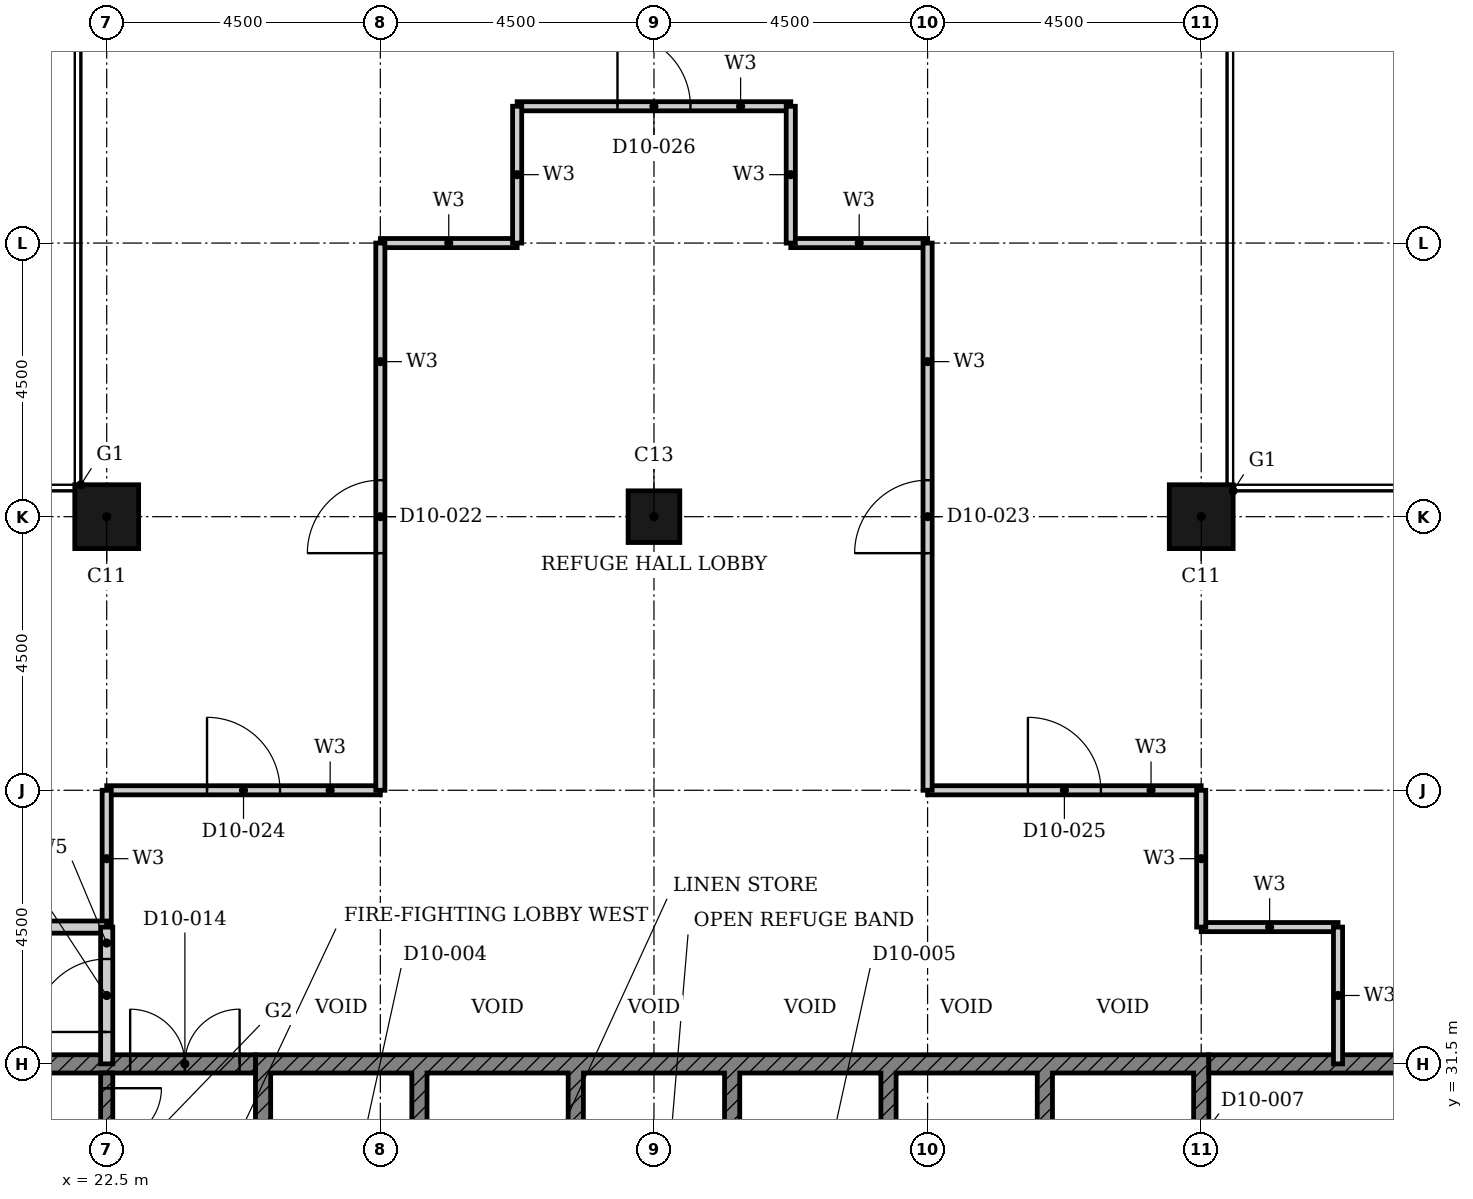
"""IFC4 building model, lengths in metres.
Left out: names, types, materials, properties, quantities, classifications, styles, units other than length and angle.
Written with IfcOpenShell. Run it as: python <this file> out.ifc"""

import sys

from ifc_helpers import new_model, si_unit, direction, frame, frame_2d, origin, origin_2d, place, context, subcontext, project, spatial, polyline, rectangle, hollow_rectangle, outline, extrude, element, fill, save


model = new_model("IFC4")
c1 = context("Model", 3, precision=1e-05, world=origin(), true_north=direction((0.0, 1.0)))
c2 = subcontext(c1, "Body", "Model", "MODEL_VIEW")
j1 = project(units=[si_unit("LENGTHUNIT", "METRE"), si_unit("PLANEANGLEUNIT", "RADIAN")], contexts=[c1])
p1 = place(None, origin())
s1 = spatial("IfcSite", under=j1, at=p1, CompositionType="ELEMENT")
p2 = place(p1, origin())
s2 = spatial("IfcBuilding", under=s1, at=p2, CompositionType="ELEMENT")
p3 = place(p2, frame((0.0, 0.0, 48.0)))
s3 = spatial("IfcBuildingStorey", under=s2, at=p3, CompositionType="ELEMENT", Elevation=48.0)
for number, where, z_axis, x_axis in (
    (1, (40.5, 40.5, 0.0), (0.0, 0.0, 1.0), (1.0, 0.0, 0.0)),
    (2, (22.5, 40.5, 0.0), (0.0, 0.0, 1.0), (1.0, 0.0, 0.0)),
):
    element("IfcColumn", number, at=place(p3, frame(where, z_axis=z_axis, x_axis=x_axis)), inside=s3, PredefinedType="COLUMN", context=c2, shape_type="SweptSolid", body=[
        extrude(hollow_rectangle(XDim=1.05, YDim=1.05, WallThickness=0.034, at=origin_2d()), origin(), (0.0, 0.0, 1.0), 4.8),
    ])
p4 = place(p3, frame((31.5, 40.5, 0.0), z_axis=(0.0, 0.0, 1.0), x_axis=(1.0, 0.0, 0.0)))
e3 = element("IfcColumn", 3, at=p4, inside=s3, PredefinedType="COLUMN", context=c2, shape_type="SweptSolid", body=[
    extrude(hollow_rectangle(XDim=0.85, YDim=0.85, WallThickness=0.026, at=origin_2d()), origin(), (0.0, 0.0, 1.0), 4.8),
])
p5 = place(p3, origin())
e4 = element("IfcWall", 4, at=p5, inside=s3, PredefinedType="SHEAR", context=c2, shape_type="SweptSolid", body=[
    extrude(outline(polyline([(24.947, 28.725), (25.197, 28.725), (25.197, 31.35), (27.518, 31.35), (27.518, 28.725), (27.768, 28.725), (27.768, 31.35), (30.089, 31.35), (30.089, 28.725), (30.339, 28.725), (30.339, 31.35), (32.661, 31.35), (32.661, 28.725), (32.911, 28.725), (32.911, 31.35), (35.232, 31.35), (35.232, 28.725), (35.482, 28.725), (35.482, 31.35), (37.803, 31.35), (37.803, 28.725), (38.053, 28.725), (38.053, 31.35), (40.375, 31.35), (40.375, 28.725), (40.625, 28.725), (40.625, 31.65), (24.947, 31.65), (24.947, 28.725)])), origin(), (0.0, 0.0, 1.0), 4.5),
])
p6 = place(p3, frame((18.15, 31.5, 0.0), z_axis=(0.0, 0.0, 1.0), x_axis=(1.0, 0.0, 0.0)))
e5 = element("IfcWall", 5, at=p6, inside=s3, PredefinedType="SHEAR", context=c2, shape_type="SweptSolid", body=[
    extrude(rectangle(XDim=6.797, YDim=0.3, at=frame_2d((3.398, 0.0))), origin(), (0.0, 0.0, 1.0), 4.5),
])
p7 = place(p6, frame((4.736, 0.0, 0.0)))
e6 = element("IfcOpeningElement", 6, at=p7, cuts=e5, PredefinedType="OPENING", context=c2, shape_type="SweptSolid", body=[
    extrude(rectangle(XDim=1.8, YDim=2.1, at=frame_2d((0.9, 1.05))), frame((0.0, 0.16, 0.0), z_axis=(0.0, -1.0, 0.0), x_axis=(1.0, 0.0, 0.0)), (0.0, 0.0, 1.0), 0.32),
])
p8 = place(p3, frame((40.625, 31.5, 0.0), z_axis=(0.0, 0.0, 1.0), x_axis=(1.0, 0.0, 0.0)))
e7 = element("IfcWall", 7, at=p8, inside=s3, PredefinedType="SHEAR", context=c2, shape_type="SweptSolid", body=[
    extrude(rectangle(XDim=4.225, YDim=0.3, at=frame_2d((2.113, 0.0))), origin(), (0.0, 0.0, 1.0), 4.5),
])
p9 = place(p3, frame((22.5, 31.35, 0.0), z_axis=(0.0, 0.0, 1.0), x_axis=(0.0, -1.0, 0.0)))
e8 = element("IfcWall", 8, at=p9, inside=s3, PredefinedType="SHEAR", context=c2, shape_type="SweptSolid", body=[
    extrude(rectangle(XDim=5.825, YDim=0.2, at=frame_2d((2.913, 0.0))), origin(), (0.0, 0.0, 1.0), 4.5),
])
p10 = place(p9, frame((0.25, 0.0, 0.0)))
e9 = element("IfcOpeningElement", 9, at=p10, cuts=e8, PredefinedType="OPENING", context=c2, shape_type="SweptSolid", body=[
    extrude(rectangle(XDim=1.8, YDim=2.1, at=frame_2d((0.9, 1.05))), frame((0.0, 0.11, 0.0), z_axis=(0.0, -1.0, 0.0), x_axis=(1.0, 0.0, 0.0)), (0.0, 0.0, 1.0), 0.22),
])
p11 = place(p3, frame((40.5, 33.75, 0.0), z_axis=(0.0, 0.0, 1.0), x_axis=(1.0, 0.0, 0.0)))
e10 = element("IfcWall", 10, at=p11, inside=s3, PredefinedType="PARTITIONING", context=c2, shape_type="SweptSolid", body=[
    extrude(rectangle(XDim=2.25, YDim=0.15, at=frame_2d((1.125, 0.0))), origin(), (0.0, 0.0, 1.0), 4.5),
])
p12 = place(p3, frame((22.5, 36.0, 0.0), z_axis=(0.0, 0.0, 1.0), x_axis=(1.0, 0.0, 0.0)))
e11 = element("IfcWall", 11, at=p12, inside=s3, PredefinedType="PARTITIONING", context=c2, shape_type="SweptSolid", body=[
    extrude(rectangle(XDim=4.5, YDim=0.15, at=frame_2d((2.25, 0.0))), origin(), (0.0, 0.0, 1.0), 4.5),
])
p13 = place(p12, frame((1.65, 0.0, 0.0)))
e12 = element("IfcOpeningElement", 12, at=p13, cuts=e11, PredefinedType="OPENING", context=c2, shape_type="SweptSolid", body=[
    extrude(rectangle(XDim=1.2, YDim=2.1, at=frame_2d((0.6, 1.05))), frame((0.0, 0.085, 0.0), z_axis=(0.0, -1.0, 0.0), x_axis=(1.0, 0.0, 0.0)), (0.0, 0.0, 1.0), 0.17),
])
p14 = place(p3, frame((36.0, 36.0, 0.0), z_axis=(0.0, 0.0, 1.0), x_axis=(1.0, 0.0, 0.0)))
e13 = element("IfcWall", 13, at=p14, inside=s3, PredefinedType="PARTITIONING", context=c2, shape_type="SweptSolid", body=[
    extrude(rectangle(XDim=4.5, YDim=0.15, at=frame_2d((2.25, 0.0))), origin(), (0.0, 0.0, 1.0), 4.5),
])
p15 = place(p14, frame((1.65, 0.0, 0.0)))
e14 = element("IfcOpeningElement", 14, at=p15, cuts=e13, PredefinedType="OPENING", context=c2, shape_type="SweptSolid", body=[
    extrude(rectangle(XDim=1.2, YDim=2.1, at=frame_2d((0.6, 1.05))), frame((0.0, 0.085, 0.0), z_axis=(0.0, -1.0, 0.0), x_axis=(1.0, 0.0, 0.0)), (0.0, 0.0, 1.0), 0.17),
])
for number, where, z_axis, x_axis in (
    (15, (27.0, 45.0, 0.0), (0.0, 0.0, 1.0), (1.0, 0.0, 0.0)),
    (16, (33.75, 45.0, 0.0), (0.0, 0.0, 1.0), (1.0, 0.0, 0.0)),
):
    element("IfcWall", number, at=place(p3, frame(where, z_axis=z_axis, x_axis=x_axis)), inside=s3, PredefinedType="PARTITIONING", context=c2, shape_type="SweptSolid", body=[
        extrude(rectangle(XDim=2.25, YDim=0.15, at=frame_2d((1.125, 0.0))), origin(), (0.0, 0.0, 1.0), 4.5),
    ])
p16 = place(p3, frame((29.25, 47.25, 0.0), z_axis=(0.0, 0.0, 1.0), x_axis=(1.0, 0.0, 0.0)))
e17 = element("IfcWall", 17, at=p16, inside=s3, PredefinedType="PARTITIONING", context=c2, shape_type="SweptSolid", body=[
    extrude(rectangle(XDim=4.5, YDim=0.15, at=frame_2d((2.25, 0.0))), origin(), (0.0, 0.0, 1.0), 4.5),
])
p17 = place(p16, frame((1.65, 0.0, 0.0)))
e18 = element("IfcOpeningElement", 18, at=p17, cuts=e17, PredefinedType="OPENING", context=c2, shape_type="SweptSolid", body=[
    extrude(rectangle(XDim=1.2, YDim=2.1, at=frame_2d((0.6, 1.05))), frame((0.0, 0.085, 0.0), z_axis=(0.0, -1.0, 0.0), x_axis=(1.0, 0.0, 0.0)), (0.0, 0.0, 1.0), 0.17),
])
p18 = place(p3, frame((22.5, 33.75, 0.0), z_axis=(0.0, 0.0, 1.0), x_axis=(0.0, 1.0, 0.0)))
e19 = element("IfcWall", 19, at=p18, inside=s3, PredefinedType="PARTITIONING", context=c2, shape_type="SweptSolid", body=[
    extrude(rectangle(XDim=2.25, YDim=0.15, at=frame_2d((1.125, 0.0))), origin(), (0.0, 0.0, 1.0), 4.5),
])
p19 = place(p3, frame((27.0, 36.0, 0.0), z_axis=(0.0, 0.0, 1.0), x_axis=(0.0, 1.0, 0.0)))
e20 = element("IfcWall", 20, at=p19, inside=s3, PredefinedType="PARTITIONING", context=c2, shape_type="SweptSolid", body=[
    extrude(rectangle(XDim=9.0, YDim=0.15, at=frame_2d((4.5, 0.0))), origin(), (0.0, 0.0, 1.0), 3.78),
])
p20 = place(p19, frame((3.9, 0.0, 0.0)))
e21 = element("IfcOpeningElement", 21, at=p20, cuts=e20, PredefinedType="OPENING", context=c2, shape_type="SweptSolid", body=[
    extrude(rectangle(XDim=1.2, YDim=2.1, at=frame_2d((0.6, 1.05))), frame((0.0, 0.085, 0.0), z_axis=(0.0, -1.0, 0.0), x_axis=(1.0, 0.0, 0.0)), (0.0, 0.0, 1.0), 0.17),
])
for number, where, z_axis, x_axis in (
    (22, (29.25, 45.0, 0.0), (0.0, 0.0, 1.0), (0.0, 1.0, 0.0)),
    (23, (33.75, 45.0, 0.0), (0.0, 0.0, 1.0), (0.0, 1.0, 0.0)),
):
    element("IfcWall", number, at=place(p3, frame(where, z_axis=z_axis, x_axis=x_axis)), inside=s3, PredefinedType="PARTITIONING", context=c2, shape_type="SweptSolid", body=[
        extrude(rectangle(XDim=2.25, YDim=0.15, at=frame_2d((1.125, 0.0))), origin(), (0.0, 0.0, 1.0), 4.5),
    ])
p21 = place(p3, frame((36.0, 36.0, 0.0), z_axis=(0.0, 0.0, 1.0), x_axis=(0.0, 1.0, 0.0)))
e24 = element("IfcWall", 24, at=p21, inside=s3, PredefinedType="PARTITIONING", context=c2, shape_type="SweptSolid", body=[
    extrude(rectangle(XDim=9.0, YDim=0.15, at=frame_2d((4.5, 0.0))), origin(), (0.0, 0.0, 1.0), 3.78),
])
p22 = place(p21, frame((3.9, 0.0, 0.0)))
e25 = element("IfcOpeningElement", 25, at=p22, cuts=e24, PredefinedType="OPENING", context=c2, shape_type="SweptSolid", body=[
    extrude(rectangle(XDim=1.2, YDim=2.1, at=frame_2d((0.6, 1.05))), frame((0.0, 0.085, 0.0), z_axis=(0.0, -1.0, 0.0), x_axis=(1.0, 0.0, 0.0)), (0.0, 0.0, 1.0), 0.17),
])
for number, where, z_axis, x_axis in (
    (26, (40.5, 33.75, 0.0), (0.0, 0.0, 1.0), (0.0, 1.0, 0.0)),
    (27, (42.75, 31.5, 0.0), (0.0, 0.0, 1.0), (0.0, 1.0, 0.0)),
):
    element("IfcWall", number, at=place(p3, frame(where, z_axis=z_axis, x_axis=x_axis)), inside=s3, PredefinedType="PARTITIONING", context=c2, shape_type="SweptSolid", body=[
        extrude(rectangle(XDim=2.25, YDim=0.15, at=frame_2d((1.125, 0.0))), origin(), (0.0, 0.0, 1.0), 4.5),
    ])
p23 = place(p3, frame((20.25, 33.75, 0.0), z_axis=(0.0, 0.0, 1.0), x_axis=(1.0, 0.0, 0.0)))
e28 = element("IfcWall", 28, at=p23, inside=s3, PredefinedType="PARTITIONING", context=c2, shape_type="SweptSolid", body=[
    extrude(rectangle(XDim=2.25, YDim=0.2, at=frame_2d((1.125, 0.0))), origin(), (0.0, 0.0, 1.0), 4.5),
])
p24 = place(p3, frame((22.5, 31.5, 0.0), z_axis=(0.0, 0.0, 1.0), x_axis=(0.0, 1.0, 0.0)))
e29 = element("IfcWall", 29, at=p24, inside=s3, PredefinedType="PARTITIONING", context=c2, shape_type="SweptSolid", body=[
    extrude(rectangle(XDim=2.25, YDim=0.2, at=frame_2d((1.125, 0.0))), origin(), (0.0, 0.0, 1.0), 4.5),
])
p25 = place(p24, frame((0.525, 0.0, 0.0)))
e30 = element("IfcOpeningElement", 30, at=p25, cuts=e29, PredefinedType="OPENING", context=c2, shape_type="SweptSolid", body=[
    extrude(rectangle(XDim=1.2, YDim=2.1, at=frame_2d((0.6, 1.05))), frame((0.0, 0.11, 0.0), z_axis=(0.0, -1.0, 0.0), x_axis=(1.0, 0.0, 0.0)), (0.0, 0.0, 1.0), 0.22),
])
p26 = place(p10, origin())
e31 = element("IfcDoor", 31, at=p26, inside=s3, OperationType="DOUBLE_DOOR_SINGLE_SWING", PredefinedType="DOOR", context=c2, shape_type="SweptSolid", body=[
    extrude(rectangle(XDim=1.8, YDim=2.1, at=frame_2d((0.9, 1.05))), frame((0.0, 0.025, 0.0), z_axis=(0.0, -1.0, 0.0), x_axis=(1.0, 0.0, 0.0)), (0.0, 0.0, 1.0), 0.05),
])
fill(e9, e31)
p27 = place(p7, origin())
e32 = element("IfcDoor", 32, at=p27, inside=s3, OperationType="DOUBLE_DOOR_SINGLE_SWING", PredefinedType="DOOR", context=c2, shape_type="SweptSolid", body=[
    extrude(rectangle(XDim=1.8, YDim=2.1, at=frame_2d((0.9, 1.05))), frame((0.0, 0.025, 0.0), z_axis=(0.0, -1.0, 0.0), x_axis=(1.0, 0.0, 0.0)), (0.0, 0.0, 1.0), 0.05),
])
fill(e6, e32)
p28 = place(p25, origin())
e33 = element("IfcDoor", 33, at=p28, inside=s3, OperationType="SINGLE_SWING_RIGHT", PredefinedType="DOOR", context=c2, shape_type="SweptSolid", body=[
    extrude(rectangle(XDim=1.2, YDim=2.1, at=frame_2d((0.6, 1.05))), frame((0.0, 0.025, 0.0), z_axis=(0.0, -1.0, 0.0), x_axis=(1.0, 0.0, 0.0)), (0.0, 0.0, 1.0), 0.05),
])
fill(e30, e33)
p29 = place(p20, origin())
e34 = element("IfcDoor", 34, at=p29, inside=s3, OperationType="SINGLE_SWING_RIGHT", PredefinedType="DOOR", context=c2, shape_type="SweptSolid", body=[
    extrude(rectangle(XDim=1.2, YDim=2.1, at=frame_2d((0.6, 1.05))), frame((0.0, 0.025, 0.0), z_axis=(0.0, -1.0, 0.0), x_axis=(1.0, 0.0, 0.0)), (0.0, 0.0, 1.0), 0.05),
])
fill(e21, e34)
p30 = place(p22, origin())
e35 = element("IfcDoor", 35, at=p30, inside=s3, OperationType="SINGLE_SWING_RIGHT", PredefinedType="DOOR", context=c2, shape_type="SweptSolid", body=[
    extrude(rectangle(XDim=1.2, YDim=2.1, at=frame_2d((0.6, 1.05))), frame((0.0, 0.025, 0.0), z_axis=(0.0, -1.0, 0.0), x_axis=(1.0, 0.0, 0.0)), (0.0, 0.0, 1.0), 0.05),
])
fill(e25, e35)
p31 = place(p13, origin())
e36 = element("IfcDoor", 36, at=p31, inside=s3, OperationType="SINGLE_SWING_RIGHT", PredefinedType="DOOR", context=c2, shape_type="SweptSolid", body=[
    extrude(rectangle(XDim=1.2, YDim=2.1, at=frame_2d((0.6, 1.05))), frame((0.0, 0.025, 0.0), z_axis=(0.0, -1.0, 0.0), x_axis=(1.0, 0.0, 0.0)), (0.0, 0.0, 1.0), 0.05),
])
fill(e12, e36)
p32 = place(p15, origin())
e37 = element("IfcDoor", 37, at=p32, inside=s3, OperationType="SINGLE_SWING_LEFT", PredefinedType="DOOR", context=c2, shape_type="SweptSolid", body=[
    extrude(rectangle(XDim=1.2, YDim=2.1, at=frame_2d((0.6, 1.05))), frame((0.0, 0.025, 0.0), z_axis=(0.0, -1.0, 0.0), x_axis=(1.0, 0.0, 0.0)), (0.0, 0.0, 1.0), 0.05),
])
fill(e14, e37)
p33 = place(p17, origin())
e38 = element("IfcDoor", 38, at=p33, inside=s3, OperationType="SINGLE_SWING_RIGHT", PredefinedType="DOOR", context=c2, shape_type="SweptSolid", body=[
    extrude(rectangle(XDim=1.2, YDim=2.1, at=frame_2d((0.6, 1.05))), frame((0.0, 0.025, 0.0), z_axis=(0.0, -1.0, 0.0), x_axis=(1.0, 0.0, 0.0)), (0.0, 0.0, 1.0), 0.05),
])
fill(e18, e38)
save(model, sys.argv[1])
